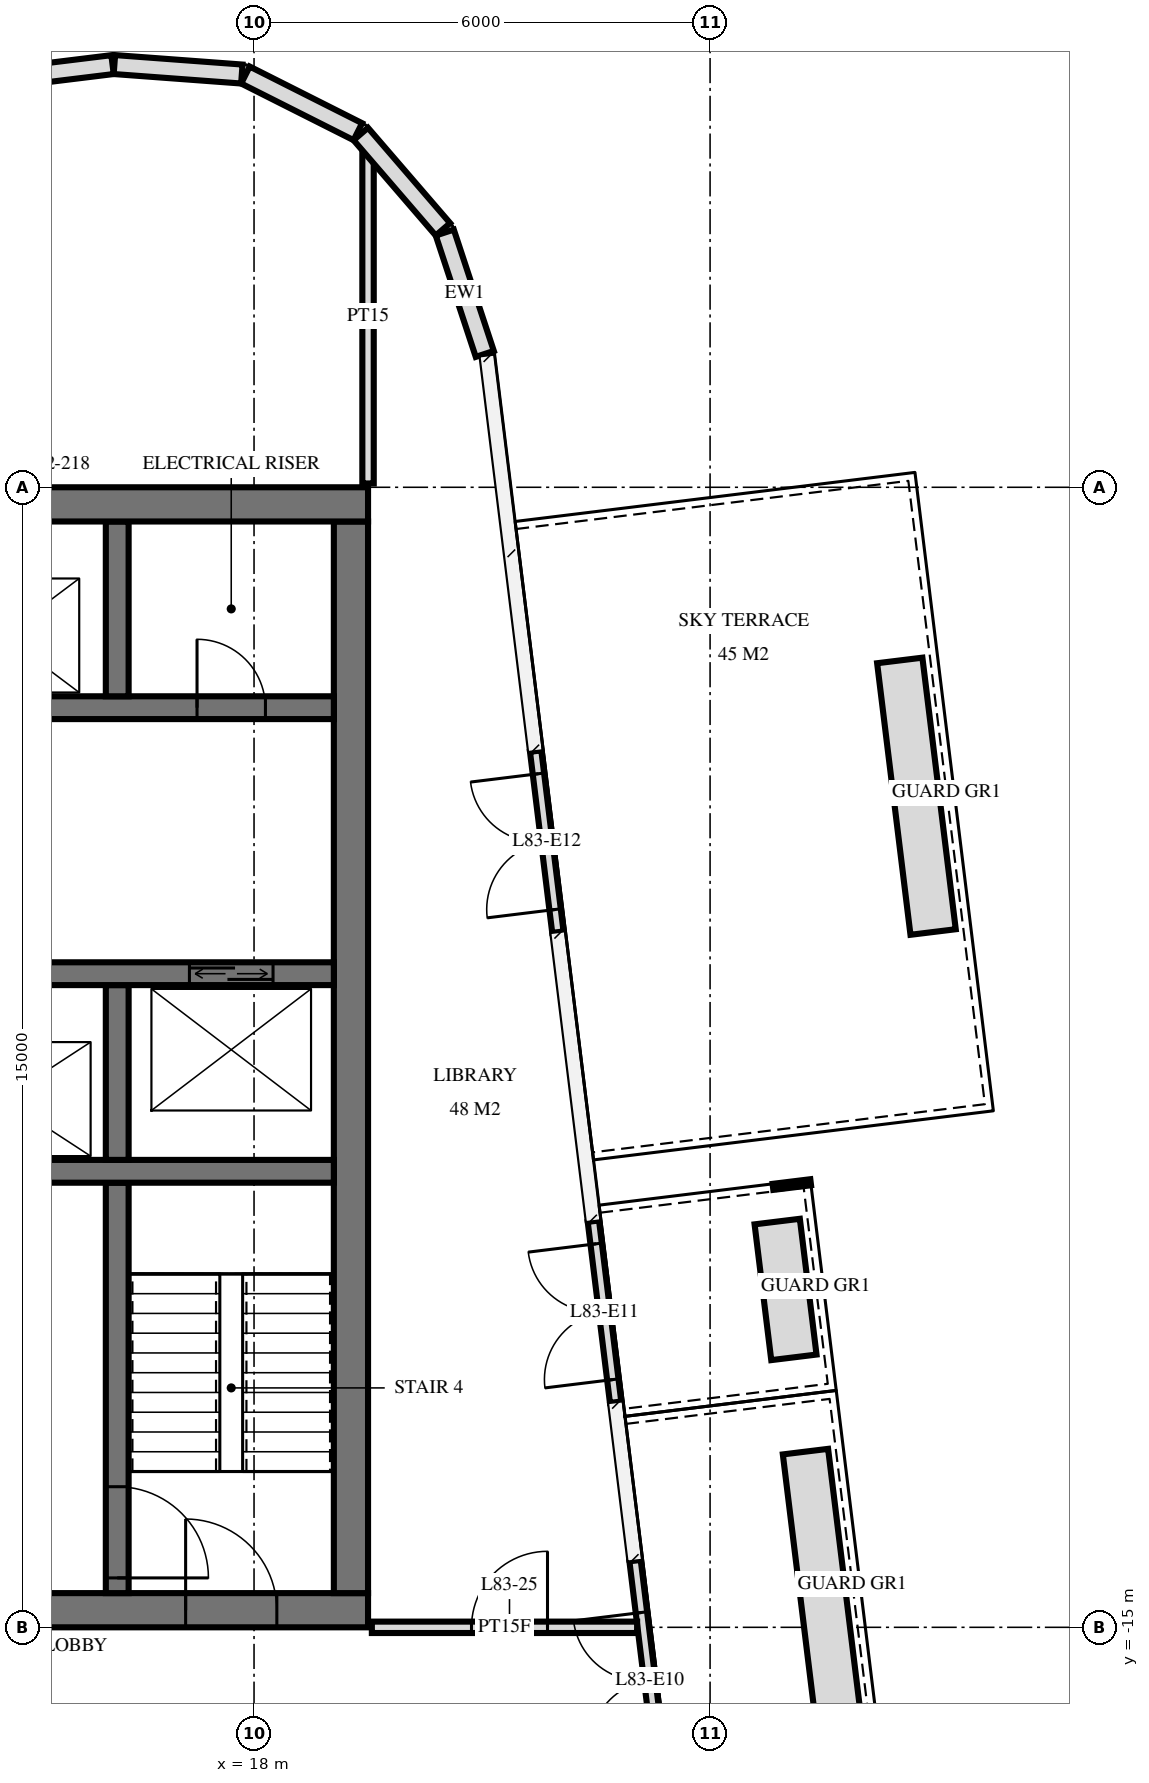
"""IFC4 building model, lengths in metres.
Left out: names, types, materials, properties, quantities, classifications, styles, units other than length and angle.
Written with IfcOpenShell. Run it as: python <this file> out.ifc"""

import sys

from ifc_helpers import new_model, si_unit, direction, frame, frame_2d, origin, place, context, subcontext, project, spatial, rectangle, extrude, element, fill, save


model = new_model("IFC4")
c1 = context("Model", 3, precision=1e-05, world=origin(), true_north=direction((0.0, 1.0)))
c2 = subcontext(c1, "Body", "Model", "MODEL_VIEW")
j1 = project(units=[si_unit("LENGTHUNIT", "METRE"), si_unit("PLANEANGLEUNIT", "RADIAN")], contexts=[c1])
p1 = place(None, origin())
s1 = spatial("IfcSite", under=j1, at=p1, CompositionType="ELEMENT")
p2 = place(p1, origin())
s2 = spatial("IfcBuilding", under=s1, at=p2, CompositionType="ELEMENT")
p3 = place(p2, frame((0.0, 0.0, 314.6)))
s3 = spatial("IfcBuildingStorey", under=s2, at=p3, CompositionType="ELEMENT", Elevation=314.6)
p4 = place(p3, frame((10.0, -0.225, 0.0), z_axis=(0.0, 0.0, 1.0), x_axis=(1.0, 0.0, 0.0)))
e1 = element("IfcWall", 1, at=p4, inside=s3, PredefinedType="SHEAR", context=c2, shape_type="SweptSolid", body=[
    extrude(rectangle(XDim=9.5, YDim=0.45, at=frame_2d((4.75, 0.0))), origin(), (0.0, 0.0, 1.0), 4.0),
])
p5 = place(p3, frame((10.0, -14.775, 0.0), z_axis=(0.0, 0.0, 1.0), x_axis=(1.0, 0.0, 0.0)))
e2 = element("IfcWall", 2, at=p5, inside=s3, PredefinedType="SHEAR", context=c2, shape_type="SweptSolid", body=[
    extrude(rectangle(XDim=9.5, YDim=0.45, at=frame_2d((4.75, 0.0))), origin(), (0.0, 0.0, 1.0), 4.0),
])
p6 = place(p5, frame((7.1, 0.0, 0.0)))
e3 = element("IfcOpeningElement", 3, at=p6, cuts=e2, PredefinedType="OPENING", context=c2, shape_type="SweptSolid", body=[
    extrude(rectangle(XDim=1.2, YDim=2.1, at=frame_2d((0.6, 1.05))), frame((0.0, 0.235, 0.0), z_axis=(0.0, -1.0, 0.0), x_axis=(1.0, 0.0, 0.0)), (0.0, 0.0, 1.0), 0.47),
])
p7 = place(p5, frame((4.15, 0.0, 0.0)))
e4 = element("IfcOpeningElement", 4, at=p7, cuts=e2, PredefinedType="OPENING", context=c2, shape_type="SweptSolid", body=[
    extrude(rectangle(XDim=1.1, YDim=2.1, at=frame_2d((0.55, 1.05))), frame((0.0, 0.235, 0.0), z_axis=(0.0, -1.0, 0.0), x_axis=(1.0, 0.0, 0.0)), (0.0, 0.0, 1.0), 0.47),
])
p8 = place(p3, frame((19.275, -14.55, 0.0), z_axis=(0.0, 0.0, 1.0), x_axis=(0.0, 1.0, 0.0)))
e5 = element("IfcWall", 5, at=p8, inside=s3, PredefinedType="SHEAR", context=c2, shape_type="SweptSolid", body=[
    extrude(rectangle(XDim=14.1, YDim=0.45, at=frame_2d((7.05, 0.0))), origin(), (0.0, 0.0, 1.0), 4.0),
])
p9 = place(p3, frame((10.35, -2.9, 0.0), z_axis=(0.0, 0.0, 1.0), x_axis=(1.0, 0.0, 0.0)))
e6 = element("IfcWall", 6, at=p9, inside=s3, PredefinedType="SHEAR", context=c2, shape_type="SweptSolid", body=[
    extrude(rectangle(XDim=8.7, YDim=0.3, at=frame_2d((4.35, 0.0))), origin(), (0.0, 0.0, 1.0), 4.0),
])
p10 = place(p9, frame((0.8, 0.0, 0.0)))
e7 = element("IfcOpeningElement", 7, at=p10, cuts=e6, PredefinedType="OPENING", context=c2, shape_type="SweptSolid", body=[
    extrude(rectangle(XDim=1.1, YDim=2.1, at=frame_2d((0.55, 1.05))), frame((0.0, 0.16, 0.0), z_axis=(0.0, -1.0, 0.0), x_axis=(1.0, 0.0, 0.0)), (0.0, 0.0, 1.0), 0.32),
])
p11 = place(p9, frame((3.8, 0.0, 0.0)))
e8 = element("IfcOpeningElement", 8, at=p11, cuts=e6, PredefinedType="OPENING", context=c2, shape_type="SweptSolid", body=[
    extrude(rectangle(XDim=1.1, YDim=2.1, at=frame_2d((0.55, 1.05))), frame((0.0, 0.16, 0.0), z_axis=(0.0, -1.0, 0.0), x_axis=(1.0, 0.0, 0.0)), (0.0, 0.0, 1.0), 0.32),
])
p12 = place(p9, frame((6.9, 0.0, 0.0)))
e9 = element("IfcOpeningElement", 9, at=p12, cuts=e6, PredefinedType="OPENING", context=c2, shape_type="SweptSolid", body=[
    extrude(rectangle(XDim=0.9, YDim=2.1, at=frame_2d((0.45, 1.05))), frame((0.0, 0.16, 0.0), z_axis=(0.0, -1.0, 0.0), x_axis=(1.0, 0.0, 0.0)), (0.0, 0.0, 1.0), 0.32),
])
p13 = place(p3, frame((10.35, -6.4, 0.0), z_axis=(0.0, 0.0, 1.0), x_axis=(1.0, 0.0, 0.0)))
e10 = element("IfcWall", 10, at=p13, inside=s3, PredefinedType="SHEAR", context=c2, shape_type="SweptSolid", body=[
    extrude(rectangle(XDim=8.7, YDim=0.3, at=frame_2d((4.35, 0.0))), origin(), (0.0, 0.0, 1.0), 4.0),
])
p14 = place(p13, frame((6.8, 0.0, 0.0)))
e11 = element("IfcOpeningElement", 11, at=p14, cuts=e10, PredefinedType="OPENING", context=c2, shape_type="SweptSolid", body=[
    extrude(rectangle(XDim=1.1, YDim=2.1, at=frame_2d((0.55, 1.05))), frame((0.0, 0.16, 0.0), z_axis=(0.0, -1.0, 0.0), x_axis=(1.0, 0.0, 0.0)), (0.0, 0.0, 1.0), 0.32),
])
p15 = place(p3, frame((10.35, -9.0, 0.0), z_axis=(0.0, 0.0, 1.0), x_axis=(1.0, 0.0, 0.0)))
e12 = element("IfcWall", 12, at=p15, inside=s3, PredefinedType="SHEAR", context=c2, shape_type="SweptSolid", body=[
    extrude(rectangle(XDim=8.7, YDim=0.3, at=frame_2d((4.35, 0.0))), origin(), (0.0, 0.0, 1.0), 4.0),
])
p16 = place(p15, frame((3.8, 0.0, 0.0)))
e13 = element("IfcOpeningElement", 13, at=p16, cuts=e12, PredefinedType="OPENING", context=c2, shape_type="SweptSolid", body=[
    extrude(rectangle(XDim=1.1, YDim=2.1, at=frame_2d((0.55, 1.05))), frame((0.0, 0.16, 0.0), z_axis=(0.0, -1.0, 0.0), x_axis=(1.0, 0.0, 0.0)), (0.0, 0.0, 1.0), 0.32),
])
for number, where, z_axis, x_axis in (
    (14, (16.2, -2.75, 0.0), (0.0, 0.0, 1.0), (0.0, 1.0, 0.0)),
    (15, (16.2, -8.85, 0.0), (0.0, 0.0, 1.0), (0.0, 1.0, 0.0)),
):
    element("IfcWall", number, at=place(p3, frame(where, z_axis=z_axis, x_axis=x_axis)), inside=s3, PredefinedType="SHEAR", context=c2, shape_type="SweptSolid", body=[
        extrude(rectangle(XDim=2.3, YDim=0.3, at=frame_2d((1.15, 0.0))), origin(), (0.0, 0.0, 1.0), 4.0),
    ])
p17 = place(p3, frame((16.2, -14.55, 0.0), z_axis=(0.0, 0.0, 1.0), x_axis=(0.0, 1.0, 0.0)))
e16 = element("IfcWall", 16, at=p17, inside=s3, PredefinedType="SHEAR", context=c2, shape_type="SweptSolid", body=[
    extrude(rectangle(XDim=5.4, YDim=0.3, at=frame_2d((2.7, 0.0))), origin(), (0.0, 0.0, 1.0), 4.0),
])
p18 = place(p17, frame((0.2, 0.0, 0.0)))
e17 = element("IfcOpeningElement", 17, at=p18, cuts=e16, PredefinedType="OPENING", context=c2, shape_type="SweptSolid", body=[
    extrude(rectangle(XDim=1.2, YDim=2.1, at=frame_2d((0.6, 1.05))), frame((0.0, 0.16, 0.0), z_axis=(0.0, -1.0, 0.0), x_axis=(1.0, 0.0, 0.0)), (0.0, 0.0, 1.0), 0.32),
])
p19 = place(p3, frame((21.036, 1.755, 0.0), z_axis=(0.0, 0.0, 1.0), x_axis=(-0.313046160822, 0.949737911844, 0.0)))
e18 = element("IfcWall", 18, at=p19, inside=s3, PredefinedType="SOLIDWALL", context=c2, shape_type="SweptSolid", body=[
    extrude(rectangle(XDim=1.681, YDim=0.25, at=frame_2d((0.841, 0.0))), origin(), (0.0, 0.0, 1.0), 3.72),
])
for number, where, z_axis, x_axis in (
    (19, (20.485, 3.394, 0.0), (0.0, 0.0, 1.0), (-0.653, 0.758, 0.0)),
    (20, (19.366, 4.679, 0.0), (0.0, 0.0, 1.0), (-0.893, 0.45, 0.0)),
):
    element("IfcWall", number, at=place(p3, frame(where, z_axis=z_axis, x_axis=x_axis)), inside=s3, PredefinedType="SOLIDWALL", context=c2, shape_type="SweptSolid", body=[
        extrude(rectangle(XDim=1.656, YDim=0.25, at=frame_2d((0.828, 0.0))), origin(), (0.0, 0.0, 1.0), 3.72),
    ])
p20 = place(p3, frame((17.84, 5.438, 0.0), z_axis=(0.0, 0.0, 1.0), x_axis=(-0.997254267475, 0.074053534713, 0.0)))
e21 = element("IfcWall", 21, at=p20, inside=s3, PredefinedType="SOLIDWALL", context=c2, shape_type="SweptSolid", body=[
    extrude(rectangle(XDim=1.681, YDim=0.25, at=frame_2d((0.841, 0.0))), origin(), (0.0, 0.0, 1.0), 3.72),
])
p21 = place(p3, frame((16.138, 5.561, 0.0), z_axis=(0.0, 0.0, 1.0), x_axis=(-0.992546726876, -0.121864658405, 0.0)))
e22 = element("IfcWall", 22, at=p21, inside=s3, PredefinedType="SOLIDWALL", context=c2, shape_type="SweptSolid", body=[
    extrude(rectangle(XDim=35.951, YDim=0.25, at=frame_2d((17.975, 0.0))), origin(), (0.0, 0.0, 1.0), 3.72),
])
p22 = place(p3, frame((23.4, -17.274, 0.0), z_axis=(0.0, 0.0, 1.0), x_axis=(-0.121858082248, 0.992547534273, 0.0)))
e23 = element("IfcWall", 23, at=p22, inside=s3, PredefinedType="USERDEFINED", context=c2, shape_type="SweptSolid", body=[
    extrude(rectangle(XDim=3.176, YDim=0.15, at=frame_2d((1.588, 0.0))), origin(), (0.0, 0.0, 1.0), 3.72),
])
p23 = place(p22, frame((0.688, 0.0, 0.0)))
e24 = element("IfcOpeningElement", 24, at=p23, cuts=e23, PredefinedType="OPENING", context=c2, shape_type="SweptSolid", body=[
    extrude(rectangle(XDim=1.8, YDim=2.4, at=frame_2d((0.9, 1.2))), frame((0.0, 0.085, 0.0), z_axis=(0.0, -1.0, 0.0), x_axis=(1.0, 0.0, 0.0)), (0.0, 0.0, 1.0), 0.17),
])
p24 = place(p3, frame((22.757, -12.038, 0.0), z_axis=(0.0, 0.0, 1.0), x_axis=(-0.121868445399, 0.992546261902, 0.0)))
e25 = element("IfcWall", 25, at=p24, inside=s3, PredefinedType="USERDEFINED", context=c2, shape_type="SweptSolid", body=[
    extrude(rectangle(XDim=2.4, YDim=0.15, at=frame_2d((1.2, 0.0))), origin(), (0.0, 0.0, 1.0), 3.72),
])
p25 = place(p24, frame((0.3, 0.0, 0.0)))
e26 = element("IfcOpeningElement", 26, at=p25, cuts=e25, PredefinedType="OPENING", context=c2, shape_type="SweptSolid", body=[
    extrude(rectangle(XDim=1.8, YDim=2.4, at=frame_2d((0.9, 1.2))), frame((0.0, 0.085, 0.0), z_axis=(0.0, -1.0, 0.0), x_axis=(1.0, 0.0, 0.0)), (0.0, 0.0, 1.0), 0.17),
])
p26 = place(p3, frame((21.998, -5.853, 0.0), z_axis=(0.0, 0.0, 1.0), x_axis=(-0.121868445399, 0.992546261902, 0.0)))
e27 = element("IfcWall", 27, at=p26, inside=s3, PredefinedType="USERDEFINED", context=c2, shape_type="SweptSolid", body=[
    extrude(rectangle(XDim=2.4, YDim=0.15, at=frame_2d((1.2, 0.0))), origin(), (0.0, 0.0, 1.0), 3.72),
])
p27 = place(p26, frame((0.3, 0.0, 0.0)))
e28 = element("IfcOpeningElement", 28, at=p27, cuts=e27, PredefinedType="OPENING", context=c2, shape_type="SweptSolid", body=[
    extrude(rectangle(XDim=1.8, YDim=2.4, at=frame_2d((0.9, 1.2))), frame((0.0, 0.085, 0.0), z_axis=(0.0, -1.0, 0.0), x_axis=(1.0, 0.0, 0.0)), (0.0, 0.0, 1.0), 0.17),
])
p28 = place(p3, frame((25.255, -12.688, 0.0), z_axis=(0.0, 0.0, 1.0), x_axis=(0.121864343918, -0.992546765488, 0.0)))
e29 = element("IfcWall", 29, at=p28, inside=s3, PredefinedType="USERDEFINED", context=c2, shape_type="SweptSolid", body=[
    extrude(rectangle(XDim=3.6, YDim=0.6, at=frame_2d((1.8, 0.0))), origin(), (0.0, 0.0, 1.0), 0.65),
])
p29 = place(p3, frame((24.883, -9.662, 0.0), z_axis=(0.0, 0.0, 1.0), x_axis=(0.121830336845, -0.992550940267, 0.0)))
e30 = element("IfcWall", 30, at=p29, inside=s3, PredefinedType="USERDEFINED", context=c2, shape_type="SweptSolid", body=[
    extrude(rectangle(XDim=1.8, YDim=0.6, at=frame_2d((0.9, 0.0))), origin(), (0.0, 0.0, 1.0), 0.65),
])
p30 = place(p3, frame((26.496, -2.278, 0.0), z_axis=(0.0, 0.0, 1.0), x_axis=(0.121864343918, -0.992546765488, 0.0)))
e31 = element("IfcWall", 31, at=p30, inside=s3, PredefinedType="USERDEFINED", context=c2, shape_type="SweptSolid", body=[
    extrude(rectangle(XDim=3.6, YDim=0.6, at=frame_2d((1.8, 0.0))), origin(), (0.0, 0.0, 1.0), 0.65),
])
p31 = place(p3, frame((19.5, 0.05, 0.0), z_axis=(0.0, 0.0, 1.0), x_axis=(0.0, 1.0, 0.0)))
e32 = element("IfcWall", 32, at=p31, inside=s3, PredefinedType="PARTITIONING", context=c2, shape_type="SweptSolid", body=[
    extrude(rectangle(XDim=4.403, YDim=0.15, at=frame_2d((2.202, 0.0))), origin(), (0.0, 0.0, 1.0), 3.72),
])
p32 = place(p3, frame((19.55, -15.0, 0.0), z_axis=(0.0, 0.0, 1.0), x_axis=(1.0, 0.0, 0.0)))
e33 = element("IfcWall", 33, at=p32, inside=s3, PredefinedType="PARTITIONING", context=c2, shape_type="SweptSolid", body=[
    extrude(rectangle(XDim=3.49, YDim=0.15, at=frame_2d((1.745, 0.0))), origin(), (0.0, 0.0, 1.0), 3.72),
])
p33 = place(p32, frame((1.311, 0.0, 0.0)))
e34 = element("IfcOpeningElement", 34, at=p33, cuts=e33, PredefinedType="OPENING", context=c2, shape_type="SweptSolid", body=[
    extrude(rectangle(XDim=1.0, YDim=2.1, at=frame_2d((0.5, 1.05))), frame((0.0, 0.085, 0.0), z_axis=(0.0, -1.0, 0.0), x_axis=(1.0, 0.0, 0.0)), (0.0, 0.0, 1.0), 0.17),
])
p34 = place(p23, origin())
e35 = element("IfcDoor", 35, at=p34, inside=s3, OperationType="DOUBLE_DOOR_SINGLE_SWING", PredefinedType="DOOR", context=c2, shape_type="SweptSolid", body=[
    extrude(rectangle(XDim=1.8, YDim=2.4, at=frame_2d((0.9, 1.2))), frame((0.0, 0.025, 0.0), z_axis=(0.0, -1.0, 0.0), x_axis=(1.0, 0.0, 0.0)), (0.0, 0.0, 1.0), 0.05),
])
fill(e24, e35)
p35 = place(p25, origin())
e36 = element("IfcDoor", 36, at=p35, inside=s3, OperationType="DOUBLE_DOOR_SINGLE_SWING", PredefinedType="DOOR", context=c2, shape_type="SweptSolid", body=[
    extrude(rectangle(XDim=1.8, YDim=2.4, at=frame_2d((0.9, 1.2))), frame((0.0, 0.025, 0.0), z_axis=(0.0, -1.0, 0.0), x_axis=(1.0, 0.0, 0.0)), (0.0, 0.0, 1.0), 0.05),
])
fill(e26, e36)
p36 = place(p27, origin())
e37 = element("IfcDoor", 37, at=p36, inside=s3, OperationType="DOUBLE_DOOR_SINGLE_SWING", PredefinedType="DOOR", context=c2, shape_type="SweptSolid", body=[
    extrude(rectangle(XDim=1.8, YDim=2.4, at=frame_2d((0.9, 1.2))), frame((0.0, 0.025, 0.0), z_axis=(0.0, -1.0, 0.0), x_axis=(1.0, 0.0, 0.0)), (0.0, 0.0, 1.0), 0.05),
])
fill(e28, e37)
p37 = place(p14, origin())
e38 = element("IfcDoor", 38, at=p37, inside=s3, OperationType="DOUBLE_DOOR_SLIDING", PredefinedType="USERDEFINED", context=c2, shape_type="SweptSolid", body=[
    extrude(rectangle(XDim=1.1, YDim=2.1, at=frame_2d((0.55, 1.05))), frame((0.0, 0.025, 0.0), z_axis=(0.0, -1.0, 0.0), x_axis=(1.0, 0.0, 0.0)), (0.0, 0.0, 1.0), 0.05),
])
fill(e11, e38)
p38 = place(p6, origin())
e39 = element("IfcDoor", 39, at=p38, inside=s3, OperationType="SINGLE_SWING_RIGHT", PredefinedType="DOOR", context=c2, shape_type="SweptSolid", body=[
    extrude(rectangle(XDim=1.2, YDim=2.1, at=frame_2d((0.6, 1.05))), frame((0.0, 0.025, 0.0), z_axis=(0.0, -1.0, 0.0), x_axis=(1.0, 0.0, 0.0)), (0.0, 0.0, 1.0), 0.05),
])
fill(e3, e39)
p39 = place(p12, origin())
e40 = element("IfcDoor", 40, at=p39, inside=s3, OperationType="SINGLE_SWING_RIGHT", PredefinedType="DOOR", context=c2, shape_type="SweptSolid", body=[
    extrude(rectangle(XDim=0.9, YDim=2.1, at=frame_2d((0.45, 1.05))), frame((0.0, 0.025, 0.0), z_axis=(0.0, -1.0, 0.0), x_axis=(1.0, 0.0, 0.0)), (0.0, 0.0, 1.0), 0.05),
])
fill(e9, e40)
p40 = place(p18, frame((0.6, 0.0, 0.0), z_axis=(0.0, 0.0, 1.0), x_axis=(-1.0, 0.0, 0.0)))
e41 = element("IfcDoor", 41, at=p40, inside=s3, OperationType="SINGLE_SWING_LEFT", PredefinedType="DOOR", context=c2, shape_type="SweptSolid", body=[
    extrude(rectangle(XDim=1.2, YDim=2.1, at=frame_2d((0.0, 1.05))), frame((0.0, -0.025, 0.0), z_axis=(0.0, 1.0, 0.0), x_axis=(-1.0, 0.0, 0.0)), (0.0, 0.0, 1.0), 0.05),
])
fill(e17, e41)
p41 = place(p33, origin())
e42 = element("IfcDoor", 42, at=p41, inside=s3, OperationType="SINGLE_SWING_LEFT", PredefinedType="DOOR", context=c2, shape_type="SweptSolid", body=[
    extrude(rectangle(XDim=1.0, YDim=2.1, at=frame_2d((0.5, 1.05))), frame((0.0, 0.025, 0.0), z_axis=(0.0, -1.0, 0.0), x_axis=(1.0, 0.0, 0.0)), (0.0, 0.0, 1.0), 0.05),
])
fill(e34, e42)
save(model, sys.argv[1])
